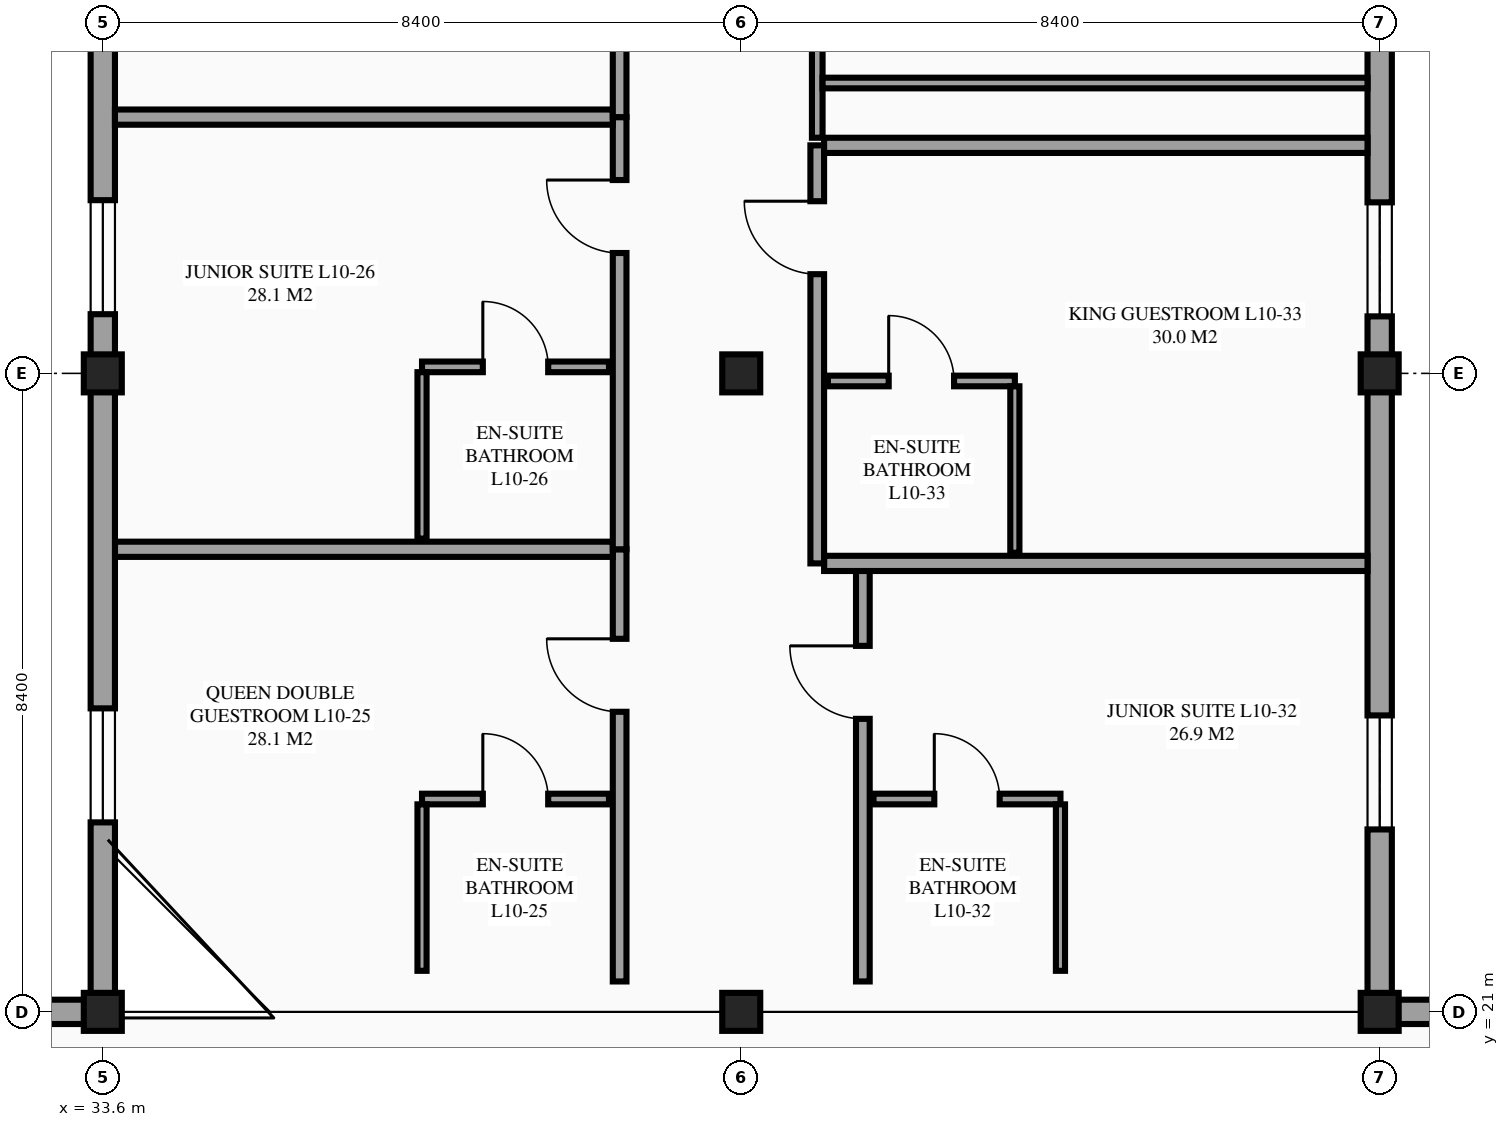
"""IFC4 building model, lengths in metres.
Left out: names, types, materials, properties, quantities, classifications, styles, units other than length and angle.
Written with IfcOpenShell. Run it as: python <this file> out.ifc"""

import sys

from ifc_helpers import new_model, si_unit, direction, frame, frame_2d, origin, origin_2d, place, context, subcontext, project, spatial, rectangle, extrude, element, fill, save


model = new_model("IFC4")
c1 = context("Model", 3, precision=1e-05, world=origin(), true_north=direction((0.0, 1.0)))
c2 = subcontext(c1, "Body", "Model", "MODEL_VIEW")
j1 = project(units=[si_unit("LENGTHUNIT", "METRE"), si_unit("PLANEANGLEUNIT", "RADIAN")], contexts=[c1])
p1 = place(None, origin())
s1 = spatial("IfcSite", under=j1, at=p1, CompositionType="ELEMENT")
p2 = place(p1, origin())
s2 = spatial("IfcBuilding", under=s1, at=p2, CompositionType="ELEMENT")
p3 = place(p2, frame((0.0, 0.0, 39.9)))
s3 = spatial("IfcBuildingStorey", under=s2, at=p3, CompositionType="ELEMENT", Elevation=39.9)
for number, where, z_axis, x_axis in (
    (1, (33.6, 21.0, 0.0), (0.0, 0.0, 1.0), (1.0, 0.0, 0.0)),
    (2, (33.6, 29.4, 0.0), (0.0, 0.0, 1.0), (1.0, 0.0, 0.0)),
    (3, (42.0, 21.0, 0.0), (0.0, 0.0, 1.0), (1.0, 0.0, 0.0)),
    (4, (42.0, 29.4, 0.0), (0.0, 0.0, 1.0), (1.0, 0.0, 0.0)),
    (5, (50.4, 21.0, 0.0), (0.0, 0.0, 1.0), (1.0, 0.0, 0.0)),
    (6, (50.4, 29.4, 0.0), (0.0, 0.0, 1.0), (1.0, 0.0, 0.0)),
):
    element("IfcColumn", number, at=place(p3, frame(where, z_axis=z_axis, x_axis=x_axis)), inside=s3, PredefinedType="COLUMN", context=c2, shape_type="SweptSolid", body=[
        extrude(rectangle(XDim=0.5, YDim=0.5, at=origin_2d()), origin(), (0.0, 0.0, 1.0), 3.6),
    ])
p4 = place(p3, frame((67.2, 21.0, 0.0), z_axis=(0.0, 0.0, 1.0), x_axis=(-1.0, 0.0, 0.0)))
e7 = element("IfcWall", 7, at=p4, inside=s3, PredefinedType="STANDARD", context=c2, shape_type="SweptSolid", body=[
    extrude(rectangle(XDim=16.8, YDim=0.32, at=frame_2d((8.4, 0.0))), origin(), (0.0, 0.0, 1.0), 2.53),
])
p5 = place(p4, frame((12.85, 0.0, 0.85)))
e8 = element("IfcOpeningElement", 8, at=p5, cuts=e7, PredefinedType="OPENING", context=c2, shape_type="SweptSolid", body=[
    extrude(rectangle(XDim=1.5, YDim=1.5, at=frame_2d((0.75, 0.75))), frame((0.0, 0.17, 0.0), z_axis=(0.0, -1.0, 0.0), x_axis=(1.0, 0.0, 0.0)), (0.0, 0.0, 1.0), 0.34),
])
p6 = place(p4, frame((6.15, 0.0, 0.85)))
e9 = element("IfcOpeningElement", 9, at=p6, cuts=e7, PredefinedType="OPENING", context=c2, shape_type="SweptSolid", body=[
    extrude(rectangle(XDim=1.5, YDim=1.5, at=frame_2d((0.75, 0.75))), frame((0.0, 0.17, 0.0), z_axis=(0.0, -1.0, 0.0), x_axis=(1.0, 0.0, 0.0)), (0.0, 0.0, 1.0), 0.34),
])
p7 = place(p4, frame((2.45, 0.0, 0.85)))
e10 = element("IfcOpeningElement", 10, at=p7, cuts=e7, PredefinedType="OPENING", context=c2, shape_type="SweptSolid", body=[
    extrude(rectangle(XDim=1.5, YDim=1.5, at=frame_2d((0.75, 0.75))), frame((0.0, 0.17, 0.0), z_axis=(0.0, -1.0, 0.0), x_axis=(1.0, 0.0, 0.0)), (0.0, 0.0, 1.0), 0.34),
])
p8 = place(p3, frame((50.4, 21.0, 0.0), z_axis=(0.0, 0.0, 1.0), x_axis=(0.0, 1.0, 0.0)))
e11 = element("IfcWall", 11, at=p8, inside=s3, PredefinedType="STANDARD", context=c2, shape_type="SweptSolid", body=[
    extrude(rectangle(XDim=16.8, YDim=0.32, at=frame_2d((8.4, 0.0))), origin(), (0.0, 0.0, 1.0), 2.48),
])
p9 = place(p8, frame((2.4, 0.0, 0.85)))
e12 = element("IfcOpeningElement", 12, at=p9, cuts=e11, PredefinedType="OPENING", context=c2, shape_type="SweptSolid", body=[
    extrude(rectangle(XDim=1.5, YDim=1.5, at=frame_2d((0.75, 0.75))), frame((0.0, 0.17, 0.0), z_axis=(0.0, -1.0, 0.0), x_axis=(1.0, 0.0, 0.0)), (0.0, 0.0, 1.0), 0.34),
])
p10 = place(p8, frame((9.15, 0.0, 0.85)))
e13 = element("IfcOpeningElement", 13, at=p10, cuts=e11, PredefinedType="OPENING", context=c2, shape_type="SweptSolid", body=[
    extrude(rectangle(XDim=1.5, YDim=1.5, at=frame_2d((0.75, 0.75))), frame((0.0, 0.17, 0.0), z_axis=(0.0, -1.0, 0.0), x_axis=(1.0, 0.0, 0.0)), (0.0, 0.0, 1.0), 0.34),
])
p11 = place(p3, frame((33.6, 37.8, 0.0), z_axis=(0.0, 0.0, 1.0), x_axis=(0.0, -1.0, 0.0)))
e14 = element("IfcWall", 14, at=p11, inside=s3, PredefinedType="STANDARD", context=c2, shape_type="SweptSolid", body=[
    extrude(rectangle(XDim=8.4, YDim=0.32, at=frame_2d((4.2, 0.0))), origin(), (0.0, 0.0, 1.0), 3.075),
])
p12 = place(p11, frame((6.121, 0.0, 0.85)))
e15 = element("IfcOpeningElement", 15, at=p12, cuts=e14, PredefinedType="OPENING", context=c2, shape_type="SweptSolid", body=[
    extrude(rectangle(XDim=1.5, YDim=1.5, at=frame_2d((0.75, 0.75))), frame((0.0, 0.17, 0.0), z_axis=(0.0, -1.0, 0.0), x_axis=(1.0, 0.0, 0.0)), (0.0, 0.0, 1.0), 0.34),
])
p13 = place(p11, frame((1.436, 0.0, 0.85)))
e16 = element("IfcOpeningElement", 16, at=p13, cuts=e14, PredefinedType="OPENING", context=c2, shape_type="SweptSolid", body=[
    extrude(rectangle(XDim=1.5, YDim=1.5, at=frame_2d((0.75, 0.75))), frame((0.0, 0.17, 0.0), z_axis=(0.0, -1.0, 0.0), x_axis=(1.0, 0.0, 0.0)), (0.0, 0.0, 1.0), 0.34),
])
p14 = place(p3, frame((33.6, 21.0, 0.0), z_axis=(0.0, 0.0, 1.0), x_axis=(-1.0, 0.0, 0.0)))
e17 = element("IfcWall", 17, at=p14, inside=s3, PredefinedType="STANDARD", context=c2, shape_type="SweptSolid", body=[
    extrude(rectangle(XDim=2.0, YDim=0.32, at=frame_2d((1.0, 0.0))), origin(), (0.0, 0.0, 1.0), 2.43),
])
p15 = place(p3, frame((40.4, 21.4, 0.0), z_axis=(0.0, 0.0, 1.0), x_axis=(0.0, 1.0, 0.0)))
e18 = element("IfcWall", 18, at=p15, inside=s3, PredefinedType="PARTITIONING", context=c2, shape_type="SweptSolid", body=[
    extrude(rectangle(XDim=5.686, YDim=0.18, at=frame_2d((2.843, 0.0))), origin(), (0.0, 0.0, 1.0), 3.375),
])
p16 = place(p15, frame((3.548, 0.0, 0.0)))
e19 = element("IfcOpeningElement", 19, at=p16, cuts=e18, PredefinedType="OPENING", context=c2, shape_type="SweptSolid", body=[
    extrude(rectangle(XDim=0.96, YDim=2.15, at=frame_2d((0.48, 1.075))), frame((0.0, 0.1, 0.0), z_axis=(0.0, -1.0, 0.0), x_axis=(1.0, 0.0, 0.0)), (0.0, 0.0, 1.0), 0.2),
])
p17 = place(p3, frame((33.76, 27.086, 0.0), z_axis=(0.0, 0.0, 1.0), x_axis=(1.0, 0.0, 0.0)))
e20 = element("IfcWall", 20, at=p17, inside=s3, PredefinedType="PARTITIONING", context=c2, shape_type="SweptSolid", body=[
    extrude(rectangle(XDim=6.55, YDim=0.2, at=frame_2d((3.275, 0.0))), origin(), (0.0, 0.0, 1.0), 3.375),
])
p18 = place(p3, frame((37.8, 23.8, 0.0), z_axis=(0.0, 0.0, 1.0), x_axis=(1.0, 0.0, 0.0)))
e21 = element("IfcWall", 21, at=p18, inside=s3, PredefinedType="PARTITIONING", context=c2, shape_type="SweptSolid", body=[
    extrude(rectangle(XDim=2.46, YDim=0.14, at=frame_2d((1.23, 0.0))), origin(), (0.0, 0.0, 1.0), 3.375),
])
p19 = place(p18, frame((0.8, 0.0, 0.0)))
e22 = element("IfcOpeningElement", 22, at=p19, cuts=e21, PredefinedType="OPENING", context=c2, shape_type="SweptSolid", body=[
    extrude(rectangle(XDim=0.86, YDim=2.1, at=frame_2d((0.43, 1.05))), frame((0.0, 0.08, 0.0), z_axis=(0.0, -1.0, 0.0), x_axis=(1.0, 0.0, 0.0)), (0.0, 0.0, 1.0), 0.16),
])
p20 = place(p3, frame((37.8, 21.54, 0.0), z_axis=(0.0, 0.0, 1.0), x_axis=(0.0, 1.0, 0.0)))
e23 = element("IfcWall", 23, at=p20, inside=s3, PredefinedType="PARTITIONING", context=c2, shape_type="SweptSolid", body=[
    extrude(rectangle(XDim=2.19, YDim=0.12, at=frame_2d((1.095, 0.0))), origin(), (0.0, 0.0, 1.0), 3.375),
])
p21 = place(p3, frame((40.4, 27.086, 0.0), z_axis=(0.0, 0.0, 1.0), x_axis=(0.0, 1.0, 0.0)))
e24 = element("IfcWall", 24, at=p21, inside=s3, PredefinedType="PARTITIONING", context=c2, shape_type="SweptSolid", body=[
    extrude(rectangle(XDim=5.686, YDim=0.18, at=frame_2d((2.843, 0.0))), origin(), (0.0, 0.0, 1.0), 3.375),
])
p22 = place(p21, frame((3.898, 0.0, 0.0)))
e25 = element("IfcOpeningElement", 25, at=p22, cuts=e24, PredefinedType="OPENING", context=c2, shape_type="SweptSolid", body=[
    extrude(rectangle(XDim=0.96, YDim=2.15, at=frame_2d((0.48, 1.075))), frame((0.0, 0.1, 0.0), z_axis=(0.0, -1.0, 0.0), x_axis=(1.0, 0.0, 0.0)), (0.0, 0.0, 1.0), 0.2),
])
p23 = place(p3, frame((33.76, 32.771, 0.0), z_axis=(0.0, 0.0, 1.0), x_axis=(1.0, 0.0, 0.0)))
e26 = element("IfcWall", 26, at=p23, inside=s3, PredefinedType="PARTITIONING", context=c2, shape_type="SweptSolid", body=[
    extrude(rectangle(XDim=6.55, YDim=0.2, at=frame_2d((3.275, 0.0))), origin(), (0.0, 0.0, 1.0), 3.375),
])
p24 = place(p3, frame((37.8, 29.486, 0.0), z_axis=(0.0, 0.0, 1.0), x_axis=(1.0, 0.0, 0.0)))
e27 = element("IfcWall", 27, at=p24, inside=s3, PredefinedType="PARTITIONING", context=c2, shape_type="SweptSolid", body=[
    extrude(rectangle(XDim=2.46, YDim=0.14, at=frame_2d((1.23, 0.0))), origin(), (0.0, 0.0, 1.0), 2.53),
])
p25 = place(p24, frame((0.8, 0.0, 0.0)))
e28 = element("IfcOpeningElement", 28, at=p25, cuts=e27, PredefinedType="OPENING", context=c2, shape_type="SweptSolid", body=[
    extrude(rectangle(XDim=0.86, YDim=2.1, at=frame_2d((0.43, 1.05))), frame((0.0, 0.08, 0.0), z_axis=(0.0, -1.0, 0.0), x_axis=(1.0, 0.0, 0.0)), (0.0, 0.0, 1.0), 0.16),
])
p26 = place(p3, frame((37.8, 27.226, 0.0), z_axis=(0.0, 0.0, 1.0), x_axis=(0.0, 1.0, 0.0)))
e29 = element("IfcWall", 29, at=p26, inside=s3, PredefinedType="PARTITIONING", context=c2, shape_type="SweptSolid", body=[
    extrude(rectangle(XDim=2.19, YDim=0.12, at=frame_2d((1.095, 0.0))), origin(), (0.0, 0.0, 1.0), 3.375),
])
p27 = place(p3, frame((40.4, 32.771, 0.0), z_axis=(0.0, 0.0, 1.0), x_axis=(0.0, 1.0, 0.0)))
e30 = element("IfcWall", 30, at=p27, inside=s3, PredefinedType="PARTITIONING", context=c2, shape_type="SweptSolid", body=[
    extrude(rectangle(XDim=5.686, YDim=0.18, at=frame_2d((2.843, 0.0))), origin(), (0.0, 0.0, 1.0), 3.375),
])
p28 = place(p27, frame((1.178, 0.0, 0.0)))
e31 = element("IfcOpeningElement", 31, at=p28, cuts=e30, PredefinedType="OPENING", context=c2, shape_type="SweptSolid", body=[
    extrude(rectangle(XDim=0.96, YDim=2.15, at=frame_2d((0.48, 1.075))), frame((0.0, 0.1, 0.0), z_axis=(0.0, -1.0, 0.0), x_axis=(1.0, 0.0, 0.0)), (0.0, 0.0, 1.0), 0.2),
])
p29 = place(p3, frame((43.6, 21.4, 0.0), z_axis=(0.0, 0.0, 1.0), x_axis=(0.0, 1.0, 0.0)))
e32 = element("IfcWall", 32, at=p29, inside=s3, PredefinedType="PARTITIONING", context=c2, shape_type="SweptSolid", body=[
    extrude(rectangle(XDim=5.5, YDim=0.18, at=frame_2d((2.75, 0.0))), origin(), (0.0, 0.0, 1.0), 3.375),
])
p30 = place(p29, frame((3.455, 0.0, 0.0)))
e33 = element("IfcOpeningElement", 33, at=p30, cuts=e32, PredefinedType="OPENING", context=c2, shape_type="SweptSolid", body=[
    extrude(rectangle(XDim=0.96, YDim=2.15, at=frame_2d((0.48, 1.075))), frame((0.0, 0.1, 0.0), z_axis=(0.0, -1.0, 0.0), x_axis=(1.0, 0.0, 0.0)), (0.0, 0.0, 1.0), 0.2),
])
p31 = place(p3, frame((43.09, 26.9, 0.0), z_axis=(0.0, 0.0, 1.0), x_axis=(1.0, 0.0, 0.0)))
e34 = element("IfcWall", 34, at=p31, inside=s3, PredefinedType="PARTITIONING", context=c2, shape_type="SweptSolid", body=[
    extrude(rectangle(XDim=7.15, YDim=0.2, at=frame_2d((3.575, 0.0))), origin(), (0.0, 0.0, 1.0), 3.375),
])
p32 = place(p3, frame((43.74, 23.8, 0.0), z_axis=(0.0, 0.0, 1.0), x_axis=(1.0, 0.0, 0.0)))
e35 = element("IfcWall", 35, at=p32, inside=s3, PredefinedType="PARTITIONING", context=c2, shape_type="SweptSolid", body=[
    extrude(rectangle(XDim=2.46, YDim=0.14, at=frame_2d((1.23, 0.0))), origin(), (0.0, 0.0, 1.0), 3.375),
])
p33 = place(p32, frame((0.8, 0.0, 0.0)))
e36 = element("IfcOpeningElement", 36, at=p33, cuts=e35, PredefinedType="OPENING", context=c2, shape_type="SweptSolid", body=[
    extrude(rectangle(XDim=0.86, YDim=2.1, at=frame_2d((0.43, 1.05))), frame((0.0, 0.08, 0.0), z_axis=(0.0, -1.0, 0.0), x_axis=(1.0, 0.0, 0.0)), (0.0, 0.0, 1.0), 0.16),
])
p34 = place(p3, frame((46.2, 21.54, 0.0), z_axis=(0.0, 0.0, 1.0), x_axis=(0.0, 1.0, 0.0)))
e37 = element("IfcWall", 37, at=p34, inside=s3, PredefinedType="PARTITIONING", context=c2, shape_type="SweptSolid", body=[
    extrude(rectangle(XDim=2.19, YDim=0.12, at=frame_2d((1.095, 0.0))), origin(), (0.0, 0.0, 1.0), 3.375),
])
p35 = place(p3, frame((43.0, 26.9, 0.0), z_axis=(0.0, 0.0, 1.0), x_axis=(0.0, 1.0, 0.0)))
e38 = element("IfcWall", 38, at=p35, inside=s3, PredefinedType="PARTITIONING", context=c2, shape_type="SweptSolid", body=[
    extrude(rectangle(XDim=5.5, YDim=0.18, at=frame_2d((2.75, 0.0))), origin(), (0.0, 0.0, 1.0), 3.375),
])
p36 = place(p35, frame((3.805, 0.0, 0.0)))
e39 = element("IfcOpeningElement", 39, at=p36, cuts=e38, PredefinedType="OPENING", context=c2, shape_type="SweptSolid", body=[
    extrude(rectangle(XDim=0.96, YDim=2.15, at=frame_2d((0.48, 1.075))), frame((0.0, 0.1, 0.0), z_axis=(0.0, -1.0, 0.0), x_axis=(1.0, 0.0, 0.0)), (0.0, 0.0, 1.0), 0.2),
])
p37 = place(p3, frame((43.09, 32.4, 0.0), z_axis=(0.0, 0.0, 1.0), x_axis=(1.0, 0.0, 0.0)))
e40 = element("IfcWall", 40, at=p37, inside=s3, PredefinedType="PARTITIONING", context=c2, shape_type="SweptSolid", body=[
    extrude(rectangle(XDim=7.15, YDim=0.2, at=frame_2d((3.575, 0.0))), origin(), (0.0, 0.0, 1.0), 3.375),
])
p38 = place(p3, frame((43.14, 29.3, 0.0), z_axis=(0.0, 0.0, 1.0), x_axis=(1.0, 0.0, 0.0)))
e41 = element("IfcWall", 41, at=p38, inside=s3, PredefinedType="PARTITIONING", context=c2, shape_type="SweptSolid", body=[
    extrude(rectangle(XDim=2.46, YDim=0.14, at=frame_2d((1.23, 0.0))), origin(), (0.0, 0.0, 1.0), 2.48),
])
p39 = place(p38, frame((0.8, 0.0, 0.0)))
e42 = element("IfcOpeningElement", 42, at=p39, cuts=e41, PredefinedType="OPENING", context=c2, shape_type="SweptSolid", body=[
    extrude(rectangle(XDim=0.86, YDim=2.1, at=frame_2d((0.43, 1.05))), frame((0.0, 0.08, 0.0), z_axis=(0.0, -1.0, 0.0), x_axis=(1.0, 0.0, 0.0)), (0.0, 0.0, 1.0), 0.16),
])
p40 = place(p3, frame((45.6, 27.04, 0.0), z_axis=(0.0, 0.0, 1.0), x_axis=(0.0, 1.0, 0.0)))
e43 = element("IfcWall", 43, at=p40, inside=s3, PredefinedType="PARTITIONING", context=c2, shape_type="SweptSolid", body=[
    extrude(rectangle(XDim=2.19, YDim=0.12, at=frame_2d((1.095, 0.0))), origin(), (0.0, 0.0, 1.0), 3.375),
])
p41 = place(p3, frame((43.0, 32.5, 0.0), z_axis=(0.0, 0.0, 1.0), x_axis=(0.0, 1.0, 0.0)))
e44 = element("IfcWall", 44, at=p41, inside=s3, PredefinedType="PARTITIONING", context=c2, shape_type="SweptSolid", body=[
    extrude(rectangle(XDim=4.8, YDim=0.14, at=frame_2d((2.4, 0.0))), origin(), (0.0, 0.0, 1.0), 3.375),
])
p42 = place(p41, frame((2.05, 0.0, 0.0)))
e45 = element("IfcOpeningElement", 45, at=p42, cuts=e44, PredefinedType="OPENING", context=c2, shape_type="SweptSolid", body=[
    extrude(rectangle(XDim=0.9, YDim=2.12, at=frame_2d((0.45, 1.06))), frame((0.0, 0.08, 0.0), z_axis=(0.0, -1.0, 0.0), x_axis=(1.0, 0.0, 0.0)), (0.0, 0.0, 1.0), 0.16),
])
p43 = place(p3, frame((43.07, 33.22, 0.0), z_axis=(0.0, 0.0, 1.0), x_axis=(1.0, 0.0, 0.0)))
e46 = element("IfcWall", 46, at=p43, inside=s3, PredefinedType="PARTITIONING", context=c2, shape_type="SweptSolid", body=[
    extrude(rectangle(XDim=7.17, YDim=0.14, at=frame_2d((3.585, 0.0))), origin(), (0.0, 0.0, 1.0), 3.375),
])
p44 = place(p3, frame((33.6, 29.4, 0.0), z_axis=(0.0, 0.0, 1.0), x_axis=(0.0, -1.0, 0.0)))
e47 = element("IfcWall", 47, at=p44, inside=s3, PredefinedType="STANDARD", context=c2, shape_type="SweptSolid", body=[
    extrude(rectangle(XDim=8.4, YDim=0.32, at=frame_2d((4.2, 0.0))), origin(), (0.0, 0.0, 1.0), 2.73),
])
p45 = place(p44, frame((4.407, 0.0, 0.85)))
e48 = element("IfcOpeningElement", 48, at=p45, cuts=e47, PredefinedType="OPENING", context=c2, shape_type="SweptSolid", body=[
    extrude(rectangle(XDim=1.5, YDim=1.5, at=frame_2d((0.75, 0.75))), frame((0.0, 0.17, 0.0), z_axis=(0.0, -1.0, 0.0), x_axis=(1.0, 0.0, 0.0)), (0.0, 0.0, 1.0), 0.34),
])
p46 = place(p45, origin())
e49 = element("IfcWindow", 49, at=p46, inside=s3, PartitioningType="SINGLE_PANEL", PredefinedType="WINDOW", context=c2, shape_type="SweptSolid", body=[
    extrude(rectangle(XDim=1.5, YDim=1.5, at=frame_2d((0.75, 0.75))), frame((0.0, 0.03, 0.0), z_axis=(0.0, -1.0, 0.0), x_axis=(1.0, 0.0, 0.0)), (0.0, 0.0, 1.0), 0.06),
])
fill(e48, e49)
p47 = place(p12, origin())
e50 = element("IfcWindow", 50, at=p47, inside=s3, PartitioningType="SINGLE_PANEL", PredefinedType="WINDOW", context=c2, shape_type="SweptSolid", body=[
    extrude(rectangle(XDim=1.5, YDim=1.5, at=frame_2d((0.75, 0.75))), frame((0.0, 0.03, 0.0), z_axis=(0.0, -1.0, 0.0), x_axis=(1.0, 0.0, 0.0)), (0.0, 0.0, 1.0), 0.06),
])
fill(e15, e50)
p48 = place(p9, origin())
e51 = element("IfcWindow", 51, at=p48, inside=s3, PartitioningType="SINGLE_PANEL", PredefinedType="WINDOW", context=c2, shape_type="SweptSolid", body=[
    extrude(rectangle(XDim=1.5, YDim=1.5, at=frame_2d((0.75, 0.75))), frame((0.0, 0.03, 0.0), z_axis=(0.0, -1.0, 0.0), x_axis=(1.0, 0.0, 0.0)), (0.0, 0.0, 1.0), 0.06),
])
fill(e12, e51)
p49 = place(p10, origin())
e52 = element("IfcWindow", 52, at=p49, inside=s3, PartitioningType="SINGLE_PANEL", PredefinedType="WINDOW", context=c2, shape_type="SweptSolid", body=[
    extrude(rectangle(XDim=1.5, YDim=1.5, at=frame_2d((0.75, 0.75))), frame((0.0, 0.03, 0.0), z_axis=(0.0, -1.0, 0.0), x_axis=(1.0, 0.0, 0.0)), (0.0, 0.0, 1.0), 0.06),
])
fill(e13, e52)
p50 = place(p16, origin())
e53 = element("IfcDoor", 53, at=p50, inside=s3, OperationType="SINGLE_SWING_RIGHT", PredefinedType="DOOR", context=c2, shape_type="SweptSolid", body=[
    extrude(rectangle(XDim=0.96, YDim=2.15, at=frame_2d((0.48, 1.075))), frame((0.0, 0.025, 0.0), z_axis=(0.0, -1.0, 0.0), x_axis=(1.0, 0.0, 0.0)), (0.0, 0.0, 1.0), 0.05),
])
fill(e19, e53)
p51 = place(p19, origin())
e54 = element("IfcDoor", 54, at=p51, inside=s3, OperationType="SINGLE_SWING_LEFT", PredefinedType="DOOR", context=c2, shape_type="SweptSolid", body=[
    extrude(rectangle(XDim=0.86, YDim=2.1, at=frame_2d((0.43, 1.05))), frame((0.0, 0.025, 0.0), z_axis=(0.0, -1.0, 0.0), x_axis=(1.0, 0.0, 0.0)), (0.0, 0.0, 1.0), 0.05),
])
fill(e22, e54)
p52 = place(p22, origin())
e55 = element("IfcDoor", 55, at=p52, inside=s3, OperationType="SINGLE_SWING_RIGHT", PredefinedType="DOOR", context=c2, shape_type="SweptSolid", body=[
    extrude(rectangle(XDim=0.96, YDim=2.15, at=frame_2d((0.48, 1.075))), frame((0.0, 0.025, 0.0), z_axis=(0.0, -1.0, 0.0), x_axis=(1.0, 0.0, 0.0)), (0.0, 0.0, 1.0), 0.05),
])
fill(e25, e55)
p53 = place(p25, origin())
e56 = element("IfcDoor", 56, at=p53, inside=s3, OperationType="SINGLE_SWING_LEFT", PredefinedType="DOOR", context=c2, shape_type="SweptSolid", body=[
    extrude(rectangle(XDim=0.86, YDim=2.1, at=frame_2d((0.43, 1.05))), frame((0.0, 0.025, 0.0), z_axis=(0.0, -1.0, 0.0), x_axis=(1.0, 0.0, 0.0)), (0.0, 0.0, 1.0), 0.05),
])
fill(e28, e56)
p54 = place(p30, origin())
e57 = element("IfcDoor", 57, at=p54, inside=s3, OperationType="SINGLE_SWING_RIGHT", PredefinedType="DOOR", context=c2, shape_type="SweptSolid", body=[
    extrude(rectangle(XDim=0.96, YDim=2.15, at=frame_2d((0.48, 1.075))), frame((0.0, 0.025, 0.0), z_axis=(0.0, -1.0, 0.0), x_axis=(1.0, 0.0, 0.0)), (0.0, 0.0, 1.0), 0.05),
])
fill(e33, e57)
p55 = place(p33, origin())
e58 = element("IfcDoor", 58, at=p55, inside=s3, OperationType="SINGLE_SWING_LEFT", PredefinedType="DOOR", context=c2, shape_type="SweptSolid", body=[
    extrude(rectangle(XDim=0.86, YDim=2.1, at=frame_2d((0.43, 1.05))), frame((0.0, 0.025, 0.0), z_axis=(0.0, -1.0, 0.0), x_axis=(1.0, 0.0, 0.0)), (0.0, 0.0, 1.0), 0.05),
])
fill(e36, e58)
p56 = place(p36, origin())
e59 = element("IfcDoor", 59, at=p56, inside=s3, OperationType="SINGLE_SWING_RIGHT", PredefinedType="DOOR", context=c2, shape_type="SweptSolid", body=[
    extrude(rectangle(XDim=0.96, YDim=2.15, at=frame_2d((0.48, 1.075))), frame((0.0, 0.025, 0.0), z_axis=(0.0, -1.0, 0.0), x_axis=(1.0, 0.0, 0.0)), (0.0, 0.0, 1.0), 0.05),
])
fill(e39, e59)
p57 = place(p39, origin())
e60 = element("IfcDoor", 60, at=p57, inside=s3, OperationType="SINGLE_SWING_LEFT", PredefinedType="DOOR", context=c2, shape_type="SweptSolid", body=[
    extrude(rectangle(XDim=0.86, YDim=2.1, at=frame_2d((0.43, 1.05))), frame((0.0, 0.025, 0.0), z_axis=(0.0, -1.0, 0.0), x_axis=(1.0, 0.0, 0.0)), (0.0, 0.0, 1.0), 0.05),
])
fill(e42, e60)
save(model, sys.argv[1])
